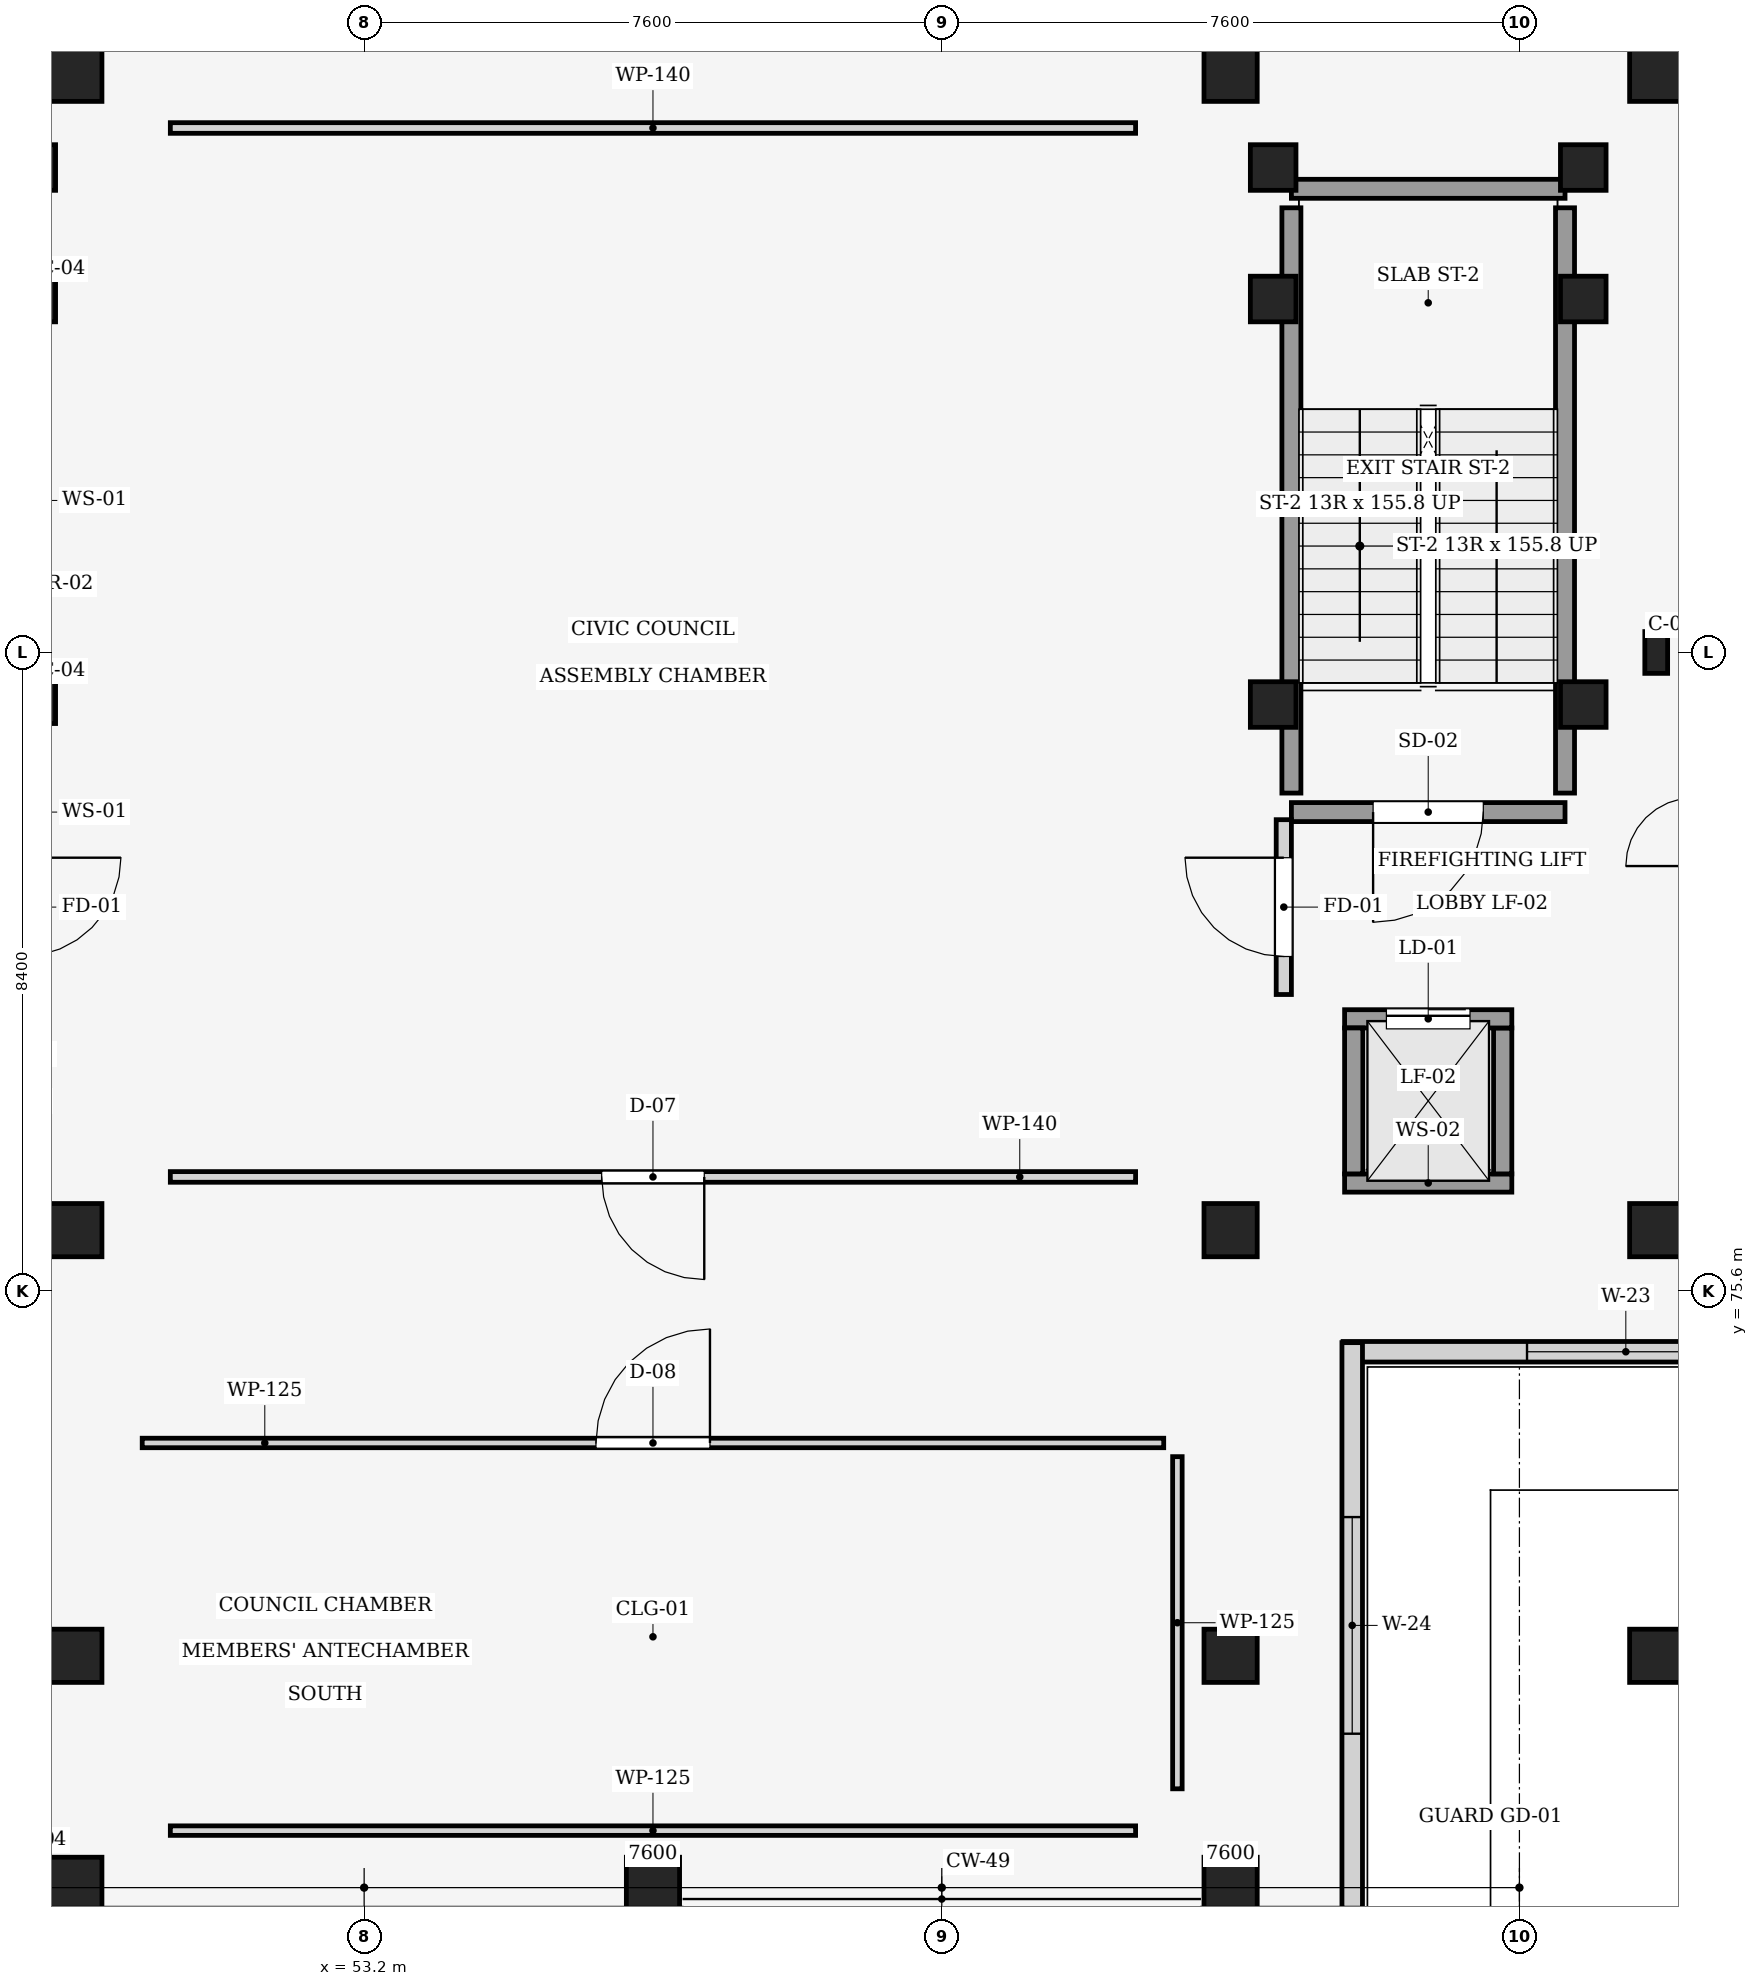
"""IFC4 building model, lengths in metres.
Left out: names, types, materials, properties, quantities, classifications, styles, units other than length and angle.
Written with IfcOpenShell. Run it as: python <this file> out.ifc"""

import sys

from ifc_helpers import new_model, si_unit, direction, frame, frame_2d, origin, origin_2d, place, context, subcontext, project, spatial, rectangle, i_section, extrude, element, fill, save


model = new_model("IFC4")
c1 = context("Model", 3, precision=1e-05, world=origin(), true_north=direction((0.0, 1.0)))
c2 = subcontext(c1, "Body", "Model", "MODEL_VIEW")
j1 = project(units=[si_unit("LENGTHUNIT", "METRE"), si_unit("PLANEANGLEUNIT", "RADIAN")], contexts=[c1])
p1 = place(None, origin())
s1 = spatial("IfcSite", under=j1, at=p1, CompositionType="ELEMENT")
p2 = place(p1, origin())
s2 = spatial("IfcBuilding", under=s1, at=p2, CompositionType="ELEMENT")
p3 = place(p2, frame((0.0, 0.0, 21.3)))
s3 = spatial("IfcBuildingStorey", under=s2, at=p3, CompositionType="ELEMENT", Elevation=21.3)
for number, where, z_axis, x_axis in (
    (1, (49.4, 70.8, 0.0), (0.0, 0.0, 1.0), (1.0, 0.0, 0.0)),
    (2, (49.4, 76.4, 0.0), (0.0, 0.0, 1.0), (1.0, 0.0, 0.0)),
    (3, (49.4, 91.6, 0.0), (0.0, 0.0, 1.0), (1.0, 0.0, 0.0)),
    (4, (64.6, 70.8, 0.0), (0.0, 0.0, 1.0), (1.0, 0.0, 0.0)),
    (5, (64.6, 76.4, 0.0), (0.0, 0.0, 1.0), (1.0, 0.0, 0.0)),
    (6, (64.6, 91.6, 0.0), (0.0, 0.0, 1.0), (1.0, 0.0, 0.0)),
    (7, (70.2, 70.8, 0.0), (0.0, 0.0, 1.0), (1.0, 0.0, 0.0)),
    (8, (70.2, 76.4, 0.0), (0.0, 0.0, 1.0), (1.0, 0.0, 0.0)),
    (9, (70.2, 91.6, 0.0), (0.0, 0.0, 1.0), (1.0, 0.0, 0.0)),
):
    element("IfcColumn", number, at=place(p3, frame(where, z_axis=z_axis, x_axis=x_axis)), inside=s3, PredefinedType="COLUMN", context=c2, shape_type="SweptSolid", body=[
        extrude(rectangle(XDim=0.7, YDim=0.7, at=origin_2d()), origin(), (0.0, 0.0, 1.0), 4.05),
    ])
p4 = place(p3, frame((70.2, 84.0, 0.0), z_axis=(0.0, 0.0, 1.0), x_axis=(1.0, 0.0, 0.0)))
e10 = element("IfcColumn", 10, at=p4, inside=s3, PredefinedType="COLUMN", context=c2, shape_type="SweptSolid", body=[
    extrude(i_section(OverallWidth=0.3, OverallDepth=0.55, WebThickness=0.015, FlangeThickness=0.029, at=origin_2d()), origin(), (0.0, 0.0, 1.0), 4.05),
])
for number, where, z_axis, x_axis in (
    (11, (49.4, 67.8, 0.0), (0.0, 0.0, 1.0), (1.0, 0.0, 0.0)),
    (12, (57.0, 67.8, 0.0), (0.0, 0.0, 1.0), (1.0, 0.0, 0.0)),
    (13, (64.6, 67.8, 0.0), (0.0, 0.0, 1.0), (1.0, 0.0, 0.0)),
):
    element("IfcColumn", number, at=place(p3, frame(where, z_axis=z_axis, x_axis=x_axis)), inside=s3, PredefinedType="COLUMN", context=c2, shape_type="SweptSolid", body=[
        extrude(rectangle(XDim=0.7, YDim=0.7, at=origin_2d()), origin(), (0.0, 0.0, 1.0), 4.05),
    ])
for number, where, z_axis, x_axis in (
    (14, (48.84, 83.365, 0.0), (0.0, 0.0, 1.0), (1.0, 0.0, 0.0)),
    (15, (48.84, 88.65, 0.0), (0.0, 0.0, 1.0), (1.0, 0.0, 0.0)),
    (16, (48.84, 90.38, 0.0), (0.0, 0.0, 1.0), (1.0, 0.0, 0.0)),
    (17, (69.24, 83.315, 0.0), (0.0, 0.0, 1.0), (1.0, 0.0, 0.0)),
    (18, (65.16, 83.315, 0.0), (0.0, 0.0, 1.0), (1.0, 0.0, 0.0)),
    (19, (69.24, 88.65, 0.0), (0.0, 0.0, 1.0), (1.0, 0.0, 0.0)),
    (20, (65.16, 88.65, 0.0), (0.0, 0.0, 1.0), (1.0, 0.0, 0.0)),
    (21, (69.24, 90.38, 0.0), (0.0, 0.0, 1.0), (1.0, 0.0, 0.0)),
    (22, (65.16, 90.38, 0.0), (0.0, 0.0, 1.0), (1.0, 0.0, 0.0)),
):
    element("IfcColumn", number, at=place(p3, frame(where, z_axis=z_axis, x_axis=x_axis)), inside=s3, PredefinedType="COLUMN", context=c2, shape_type="SweptSolid", body=[
        extrude(rectangle(XDim=0.6, YDim=0.6, at=origin_2d()), origin(), (0.0, 0.0, 1.0), 4.05),
    ])
p5 = place(p3, frame((73.52, 74.8, 0.0), z_axis=(0.0, 0.0, 1.0), x_axis=(-1.0, 0.0, 0.0)))
e23 = element("IfcWall", 23, at=p5, inside=s3, PredefinedType="STANDARD", context=c2, shape_type="SweptSolid", body=[
    extrude(rectangle(XDim=7.44, YDim=0.27, at=frame_2d((3.72, 0.0))), origin(), (0.0, 0.0, 1.0), 3.015),
])
p6 = place(p5, frame((2.42, 0.0, 0.85)))
e24 = element("IfcOpeningElement", 24, at=p6, cuts=e23, PredefinedType="OPENING", context=c2, shape_type="SweptSolid", body=[
    extrude(rectangle(XDim=2.6, YDim=1.65, at=frame_2d((1.3, 0.825))), frame((0.0, 0.145, 0.0), z_axis=(0.0, -1.0, 0.0), x_axis=(1.0, 0.0, 0.0)), (0.0, 0.0, 1.0), 0.29),
])
p7 = place(p3, frame((66.2, 74.92, 0.0), z_axis=(0.0, 0.0, 1.0), x_axis=(0.0, -1.0, 0.0)))
e25 = element("IfcWall", 25, at=p7, inside=s3, PredefinedType="STANDARD", context=c2, shape_type="SweptSolid", body=[
    extrude(rectangle(XDim=7.44, YDim=0.27, at=frame_2d((3.72, 0.0))), origin(), (0.0, 0.0, 1.0), 3.015),
])
p8 = place(p7, frame((2.295, 0.0, 0.85)))
e26 = element("IfcOpeningElement", 26, at=p8, cuts=e25, PredefinedType="OPENING", context=c2, shape_type="SweptSolid", body=[
    extrude(rectangle(XDim=2.85, YDim=1.65, at=frame_2d((1.425, 0.825))), frame((0.0, 0.145, 0.0), z_axis=(0.0, -1.0, 0.0), x_axis=(1.0, 0.0, 0.0)), (0.0, 0.0, 1.0), 0.29),
])
p9 = place(p3, frame((69.0, 81.9, 0.0), z_axis=(0.0, 0.0, 1.0), x_axis=(-1.0, 0.0, 0.0)))
e27 = element("IfcWall", 27, at=p9, inside=s3, PredefinedType="SHEAR", context=c2, shape_type="SweptSolid", body=[
    extrude(rectangle(XDim=3.6, YDim=0.25, at=frame_2d((1.8, 0.0))), origin(), (0.0, 0.0, 1.0), 4.05),
])
p10 = place(p9, frame((1.075, 0.0, 0.0)))
e28 = element("IfcOpeningElement", 28, at=p10, cuts=e27, PredefinedType="OPENING", context=c2, shape_type="SweptSolid", body=[
    extrude(rectangle(XDim=1.45, YDim=2.2, at=frame_2d((0.725, 1.1))), frame((0.0, 0.135, 0.0), z_axis=(0.0, -1.0, 0.0), x_axis=(1.0, 0.0, 0.0)), (0.0, 0.0, 1.0), 0.27),
])
p11 = place(p3, frame((65.4, 82.15, 0.0), z_axis=(0.0, 0.0, 1.0), x_axis=(0.0, 1.0, 0.0)))
e29 = element("IfcWall", 29, at=p11, inside=s3, PredefinedType="SHEAR", context=c2, shape_type="SweptSolid", body=[
    extrude(rectangle(XDim=7.7, YDim=0.25, at=frame_2d((3.85, 0.0))), origin(), (0.0, 0.0, 1.0), 4.05),
])
p12 = place(p3, frame((65.4, 90.1, 0.0), z_axis=(0.0, 0.0, 1.0), x_axis=(1.0, 0.0, 0.0)))
e30 = element("IfcWall", 30, at=p12, inside=s3, PredefinedType="SHEAR", context=c2, shape_type="SweptSolid", body=[
    extrude(rectangle(XDim=3.6, YDim=0.25, at=frame_2d((1.8, 0.0))), origin(), (0.0, 0.0, 1.0), 4.05),
])
p13 = place(p3, frame((69.0, 89.85, 0.0), z_axis=(0.0, 0.0, 1.0), x_axis=(0.0, -1.0, 0.0)))
e31 = element("IfcWall", 31, at=p13, inside=s3, PredefinedType="SHEAR", context=c2, shape_type="SweptSolid", body=[
    extrude(rectangle(XDim=7.7, YDim=0.25, at=frame_2d((3.85, 0.0))), origin(), (0.0, 0.0, 1.0), 4.05),
])
p14 = place(p3, frame((68.3, 77.02, 0.0), z_axis=(0.0, 0.0, 1.0), x_axis=(-1.0, 0.0, 0.0)))
e32 = element("IfcWall", 32, at=p14, inside=s3, PredefinedType="SHEAR", context=c2, shape_type="SweptSolid", body=[
    extrude(rectangle(XDim=2.2, YDim=0.24, at=frame_2d((1.1, 0.0))), origin(), (0.0, 0.0, 1.0), 4.05),
])
p15 = place(p3, frame((68.18, 79.06, 0.0), z_axis=(0.0, 0.0, 1.0), x_axis=(0.0, -1.0, 0.0)))
e33 = element("IfcWall", 33, at=p15, inside=s3, PredefinedType="SHEAR", context=c2, shape_type="SweptSolid", body=[
    extrude(rectangle(XDim=1.92, YDim=0.24, at=frame_2d((0.96, 0.0))), origin(), (0.0, 0.0, 1.0), 4.05),
])
p16 = place(p3, frame((66.1, 79.18, 0.0), z_axis=(0.0, 0.0, 1.0), x_axis=(1.0, 0.0, 0.0)))
e34 = element("IfcWall", 34, at=p16, inside=s3, PredefinedType="SHEAR", context=c2, shape_type="SweptSolid", body=[
    extrude(rectangle(XDim=2.2, YDim=0.24, at=frame_2d((1.1, 0.0))), origin(), (0.0, 0.0, 1.0), 4.05),
])
p17 = place(p16, frame((0.55, 0.0, 0.0)))
e35 = element("IfcOpeningElement", 35, at=p17, cuts=e34, PredefinedType="OPENING", context=c2, shape_type="SweptSolid", body=[
    extrude(rectangle(XDim=1.1, YDim=2.15, at=frame_2d((0.55, 1.075))), frame((0.0, 0.13, 0.0), z_axis=(0.0, -1.0, 0.0), x_axis=(1.0, 0.0, 0.0)), (0.0, 0.0, 1.0), 0.26),
])
p18 = place(p3, frame((66.22, 77.14, 0.0), z_axis=(0.0, 0.0, 1.0), x_axis=(0.0, 1.0, 0.0)))
e36 = element("IfcWall", 36, at=p18, inside=s3, PredefinedType="SHEAR", context=c2, shape_type="SweptSolid", body=[
    extrude(rectangle(XDim=1.92, YDim=0.24, at=frame_2d((0.96, 0.0))), origin(), (0.0, 0.0, 1.0), 4.05),
])
p19 = place(p3, frame((65.3, 79.5, 0.0), z_axis=(0.0, 0.0, 1.0), x_axis=(0.0, 1.0, 0.0)))
e37 = element("IfcWall", 37, at=p19, inside=s3, PredefinedType="PARTITIONING", context=c2, shape_type="SweptSolid", body=[
    extrude(rectangle(XDim=2.3, YDim=0.2, at=frame_2d((1.15, 0.0))), origin(), (0.0, 0.0, 1.0), 2.9),
])
p20 = place(p19, frame((0.5, 0.0, 0.0)))
e38 = element("IfcOpeningElement", 38, at=p20, cuts=e37, PredefinedType="OPENING", context=c2, shape_type="SweptSolid", body=[
    extrude(rectangle(XDim=1.3, YDim=2.2, at=frame_2d((0.65, 1.1))), frame((0.0, 0.11, 0.0), z_axis=(0.0, -1.0, 0.0), x_axis=(1.0, 0.0, 0.0)), (0.0, 0.0, 1.0), 0.22),
])
p21 = place(p3, frame((63.35, 77.1, 0.0), z_axis=(0.0, 0.0, 1.0), x_axis=(-1.0, 0.0, 0.0)))
e39 = element("IfcWall", 39, at=p21, inside=s3, PredefinedType="PARTITIONING", context=c2, shape_type="SweptSolid", body=[
    extrude(rectangle(XDim=12.7, YDim=0.14, at=frame_2d((6.35, 0.0))), origin(), (0.0, 0.0, 1.0), 3.7),
])
p22 = place(p21, frame((5.675, 0.0, 0.0)))
e40 = element("IfcOpeningElement", 40, at=p22, cuts=e39, PredefinedType="OPENING", context=c2, shape_type="SweptSolid", body=[
    extrude(rectangle(XDim=1.35, YDim=2.1, at=frame_2d((0.675, 1.05))), frame((0.0, 0.08, 0.0), z_axis=(0.0, -1.0, 0.0), x_axis=(1.0, 0.0, 0.0)), (0.0, 0.0, 1.0), 0.16),
])
p23 = place(p3, frame((50.65, 90.9, 0.0), z_axis=(0.0, 0.0, 1.0), x_axis=(1.0, 0.0, 0.0)))
e41 = element("IfcWall", 41, at=p23, inside=s3, PredefinedType="PARTITIONING", context=c2, shape_type="SweptSolid", body=[
    extrude(rectangle(XDim=12.7, YDim=0.14, at=frame_2d((6.35, 0.0))), origin(), (0.0, 0.0, 1.0), 3.7),
])
p24 = place(p3, frame((50.28, 73.6, 0.0), z_axis=(0.0, 0.0, 1.0), x_axis=(1.0, 0.0, 0.0)))
e42 = element("IfcWall", 42, at=p24, inside=s3, PredefinedType="PARTITIONING", context=c2, shape_type="SweptSolid", body=[
    extrude(rectangle(XDim=13.44, YDim=0.125, at=frame_2d((6.72, 0.0))), origin(), (0.0, 0.0, 1.0), 3.7),
])
p25 = place(p24, frame((5.97, 0.0, 0.0)))
e43 = element("IfcOpeningElement", 43, at=p25, cuts=e42, PredefinedType="OPENING", context=c2, shape_type="SweptSolid", body=[
    extrude(rectangle(XDim=1.5, YDim=2.1, at=frame_2d((0.75, 1.05))), frame((0.0, 0.073, 0.0), z_axis=(0.0, -1.0, 0.0), x_axis=(1.0, 0.0, 0.0)), (0.0, 0.0, 1.0), 0.145),
])
p26 = place(p3, frame((63.35, 68.5, 0.0), z_axis=(0.0, 0.0, 1.0), x_axis=(-1.0, 0.0, 0.0)))
e44 = element("IfcWall", 44, at=p26, inside=s3, PredefinedType="PARTITIONING", context=c2, shape_type="SweptSolid", body=[
    extrude(rectangle(XDim=12.7, YDim=0.125, at=frame_2d((6.35, 0.0))), origin(), (0.0, 0.0, 1.0), 3.7),
])
p27 = place(p3, frame((63.9, 73.42, 0.0), z_axis=(0.0, 0.0, 1.0), x_axis=(0.0, -1.0, 0.0)))
e45 = element("IfcWall", 45, at=p27, inside=s3, PredefinedType="PARTITIONING", context=c2, shape_type="SweptSolid", body=[
    extrude(rectangle(XDim=4.37, YDim=0.125, at=frame_2d((2.185, 0.0))), origin(), (0.0, 0.0, 1.0), 3.115),
])
p28 = place(p6, origin())
e46 = element("IfcWindow", 46, at=p28, inside=s3, PartitioningType="SINGLE_PANEL", PredefinedType="WINDOW", context=c2, shape_type="SweptSolid", body=[
    extrude(rectangle(XDim=2.6, YDim=1.65, at=frame_2d((1.3, 0.825))), frame((0.0, 0.03, 0.0), z_axis=(0.0, -1.0, 0.0), x_axis=(1.0, 0.0, 0.0)), (0.0, 0.0, 1.0), 0.06),
])
fill(e24, e46)
p29 = place(p8, origin())
e47 = element("IfcWindow", 47, at=p29, inside=s3, PartitioningType="SINGLE_PANEL", PredefinedType="WINDOW", context=c2, shape_type="SweptSolid", body=[
    extrude(rectangle(XDim=2.85, YDim=1.65, at=frame_2d((1.425, 0.825))), frame((0.0, 0.03, 0.0), z_axis=(0.0, -1.0, 0.0), x_axis=(1.0, 0.0, 0.0)), (0.0, 0.0, 1.0), 0.06),
])
fill(e26, e47)
p30 = place(p10, origin())
e48 = element("IfcDoor", 48, at=p30, inside=s3, OperationType="SINGLE_SWING_RIGHT", PredefinedType="DOOR", context=c2, shape_type="SweptSolid", body=[
    extrude(rectangle(XDim=1.45, YDim=2.2, at=frame_2d((0.725, 1.1))), frame((0.0, 0.025, 0.0), z_axis=(0.0, -1.0, 0.0), x_axis=(1.0, 0.0, 0.0)), (0.0, 0.0, 1.0), 0.05),
])
fill(e28, e48)
p31 = place(p17, origin())
e49 = element("IfcDoor", 49, at=p31, inside=s3, OperationType="SLIDING_TO_RIGHT", PredefinedType="DOOR", context=c2, shape_type="SweptSolid", body=[
    extrude(rectangle(XDim=1.1, YDim=2.15, at=frame_2d((0.55, 1.075))), frame((0.0, 0.025, 0.0), z_axis=(0.0, -1.0, 0.0), x_axis=(1.0, 0.0, 0.0)), (0.0, 0.0, 1.0), 0.05),
])
fill(e35, e49)
p32 = place(p20, origin())
e50 = element("IfcDoor", 50, at=p32, inside=s3, OperationType="SINGLE_SWING_RIGHT", PredefinedType="DOOR", context=c2, shape_type="SweptSolid", body=[
    extrude(rectangle(XDim=1.3, YDim=2.2, at=frame_2d((0.65, 1.1))), frame((0.0, 0.025, 0.0), z_axis=(0.0, -1.0, 0.0), x_axis=(1.0, 0.0, 0.0)), (0.0, 0.0, 1.0), 0.05),
])
fill(e38, e50)
p33 = place(p22, origin())
e51 = element("IfcDoor", 51, at=p33, inside=s3, OperationType="SINGLE_SWING_LEFT", PredefinedType="DOOR", context=c2, shape_type="SweptSolid", body=[
    extrude(rectangle(XDim=1.35, YDim=2.1, at=frame_2d((0.675, 1.05))), frame((0.0, 0.025, 0.0), z_axis=(0.0, -1.0, 0.0), x_axis=(1.0, 0.0, 0.0)), (0.0, 0.0, 1.0), 0.05),
])
fill(e40, e51)
p34 = place(p25, origin())
e52 = element("IfcDoor", 52, at=p34, inside=s3, OperationType="SINGLE_SWING_RIGHT", PredefinedType="DOOR", context=c2, shape_type="SweptSolid", body=[
    extrude(rectangle(XDim=1.5, YDim=2.1, at=frame_2d((0.75, 1.05))), frame((0.0, 0.025, 0.0), z_axis=(0.0, -1.0, 0.0), x_axis=(1.0, 0.0, 0.0)), (0.0, 0.0, 1.0), 0.05),
])
fill(e43, e52)
save(model, sys.argv[1])
